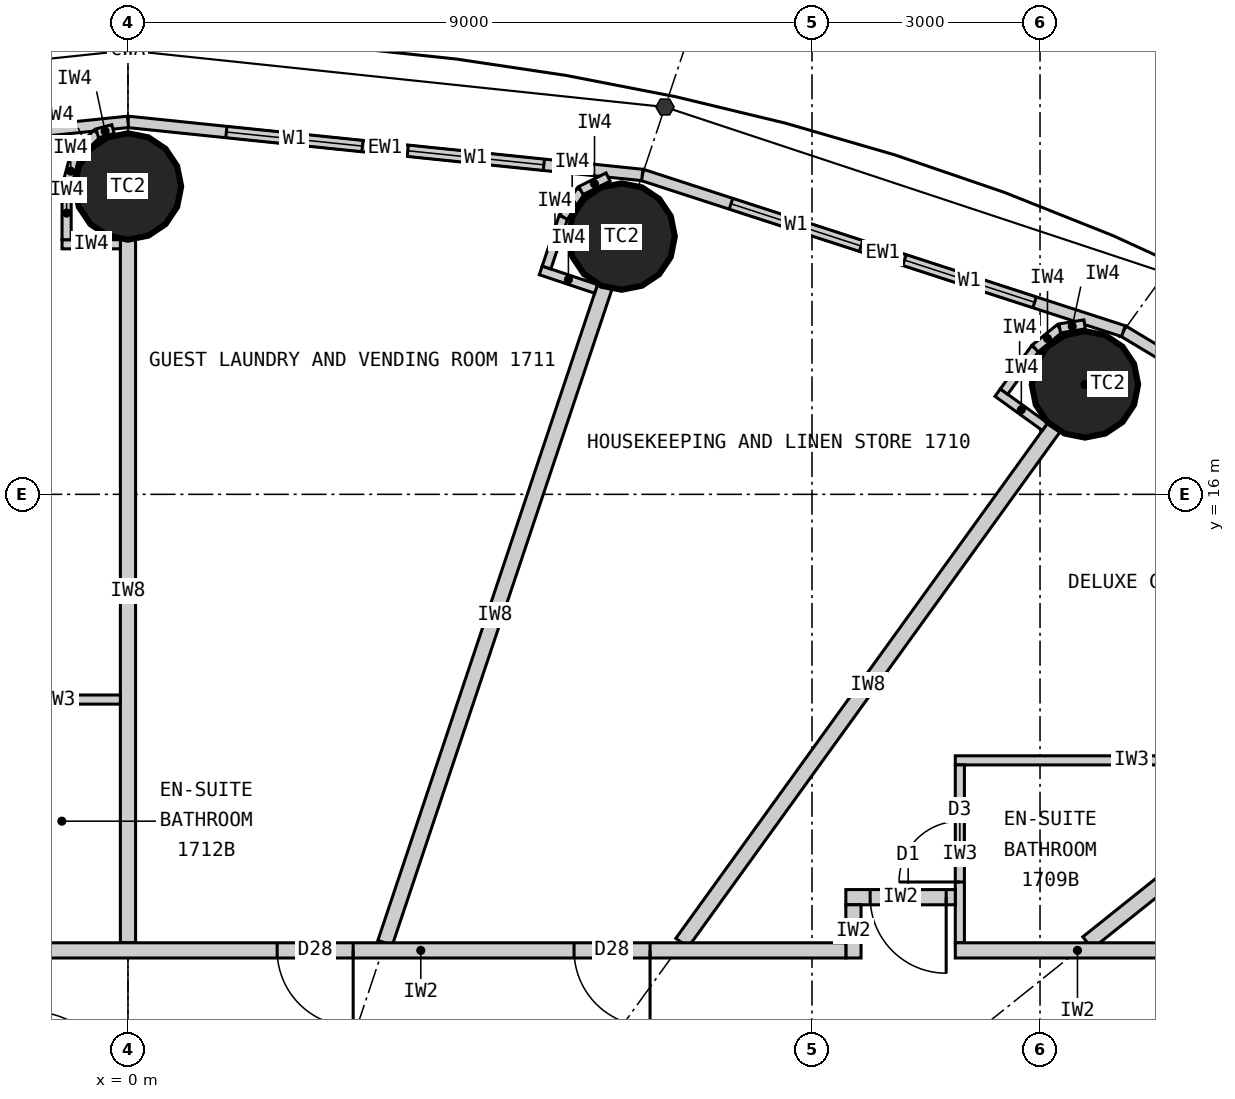
"""IFC4 building model, lengths in metres.
Left out: names, types, materials, properties, quantities, classifications, styles, units other than length and angle.
Written with IfcOpenShell. Run it as: python <this file> out.ifc"""

import sys

from ifc_helpers import new_model, si_unit, direction, frame, frame_2d, origin, origin_2d, place, context, subcontext, project, spatial, rectangle, circle, extrude, element, fill, save


model = new_model("IFC4")
c1 = context("Model", 3, precision=1e-05, world=origin(), true_north=direction((0.0, 1.0)))
c2 = subcontext(c1, "Body", "Model", "MODEL_VIEW")
j1 = project(units=[si_unit("LENGTHUNIT", "METRE"), si_unit("PLANEANGLEUNIT", "RADIAN")], contexts=[c1])
p1 = place(None, origin())
s1 = spatial("IfcSite", under=j1, at=p1, CompositionType="ELEMENT")
p2 = place(p1, origin())
s2 = spatial("IfcBuilding", under=s1, at=p2, CompositionType="ELEMENT")
p3 = place(p2, frame((0.0, 0.0, 70.5)))
s3 = spatial("IfcBuildingStorey", under=s2, at=p3, CompositionType="ELEMENT", Elevation=70.5)
for number, where, z_axis, x_axis in (
    (1, (12.591, 17.447, 0.0), (0.0, 0.0, 1.0), (1.0, 0.0, 0.0)),
    (2, (6.495, 19.391, 0.0), (0.0, 0.0, 1.0), (1.0, 0.0, 0.0)),
    (3, (0.0, 20.05, 0.0), (0.0, 0.0, 1.0), (1.0, 0.0, 0.0)),
):
    element("IfcColumn", number, at=place(p3, frame(where, z_axis=z_axis, x_axis=x_axis)), inside=s3, PredefinedType="COLUMN", context=c2, shape_type="SweptSolid", body=[
        extrude(circle(Radius=0.7, at=origin_2d()), origin(), (0.0, 0.0, 1.0), 3.3),
    ])
p4 = place(p3, frame((18.57, 14.856, 0.0), z_axis=(0.0, 0.0, 1.0), x_axis=(-0.856983180864, 0.515344377787, 0.0)))
e4 = element("IfcWall", 4, at=p4, inside=s3, PredefinedType="ELEMENTEDWALL", context=c2, shape_type="SweptSolid", body=[
    extrude(rectangle(XDim=6.386, YDim=0.15, at=frame_2d((3.193, 0.0))), origin(), (0.0, 0.0, 1.0), 3.12),
])
p5 = place(p4, frame((1.093, 0.0, 0.9)))
e5 = element("IfcOpeningElement", 5, at=p5, cuts=e4, PredefinedType="OPENING", context=c2, shape_type="SweptSolid", body=[
    extrude(rectangle(XDim=1.8, YDim=1.9, at=frame_2d((0.9, 0.95))), frame((0.0, 0.085, 0.0), z_axis=(0.0, -1.0, 0.0), x_axis=(1.0, 0.0, 0.0)), (0.0, 0.0, 1.0), 0.17),
])
p6 = place(p4, frame((3.493, 0.0, 0.9)))
e6 = element("IfcOpeningElement", 6, at=p6, cuts=e4, PredefinedType="OPENING", context=c2, shape_type="SweptSolid", body=[
    extrude(rectangle(XDim=1.8, YDim=1.9, at=frame_2d((0.9, 0.95))), frame((0.0, 0.085, 0.0), z_axis=(0.0, -1.0, 0.0), x_axis=(1.0, 0.0, 0.0)), (0.0, 0.0, 1.0), 0.17),
])
p7 = place(p3, frame((13.096, 18.147, 0.0), z_axis=(0.0, 0.0, 1.0), x_axis=(-0.951137534625, 0.308767534285, 0.0)))
e7 = element("IfcWall", 7, at=p7, inside=s3, PredefinedType="ELEMENTEDWALL", context=c2, shape_type="SweptSolid", body=[
    extrude(rectangle(XDim=6.655, YDim=0.15, at=frame_2d((3.328, 0.0))), origin(), (0.0, 0.0, 1.0), 3.12),
])
p8 = place(p7, frame((1.228, 0.0, 0.9)))
e8 = element("IfcOpeningElement", 8, at=p8, cuts=e7, PredefinedType="OPENING", context=c2, shape_type="SweptSolid", body=[
    extrude(rectangle(XDim=1.8, YDim=1.9, at=frame_2d((0.9, 0.95))), frame((0.0, 0.085, 0.0), z_axis=(0.0, -1.0, 0.0), x_axis=(1.0, 0.0, 0.0)), (0.0, 0.0, 1.0), 0.17),
])
p9 = place(p7, frame((3.628, 0.0, 0.9)))
e9 = element("IfcOpeningElement", 9, at=p9, cuts=e7, PredefinedType="OPENING", context=c2, shape_type="SweptSolid", body=[
    extrude(rectangle(XDim=1.8, YDim=1.9, at=frame_2d((0.9, 0.95))), frame((0.0, 0.085, 0.0), z_axis=(0.0, -1.0, 0.0), x_axis=(1.0, 0.0, 0.0)), (0.0, 0.0, 1.0), 0.17),
])
p10 = place(p3, frame((6.766, 20.202, 0.0), z_axis=(0.0, 0.0, 1.0), x_axis=(-0.994721394369, 0.102612609291, 0.0)))
e10 = element("IfcWall", 10, at=p10, inside=s3, PredefinedType="ELEMENTEDWALL", context=c2, shape_type="SweptSolid", body=[
    extrude(rectangle(XDim=6.802, YDim=0.15, at=frame_2d((3.401, 0.0))), origin(), (0.0, 0.0, 1.0), 3.12),
])
p11 = place(p10, frame((1.301, 0.0, 0.9)))
e11 = element("IfcOpeningElement", 11, at=p11, cuts=e10, PredefinedType="OPENING", context=c2, shape_type="SweptSolid", body=[
    extrude(rectangle(XDim=1.8, YDim=1.9, at=frame_2d((0.9, 0.95))), frame((0.0, 0.085, 0.0), z_axis=(0.0, -1.0, 0.0), x_axis=(1.0, 0.0, 0.0)), (0.0, 0.0, 1.0), 0.17),
])
p12 = place(p10, frame((3.701, 0.0, 0.9)))
e12 = element("IfcOpeningElement", 12, at=p12, cuts=e10, PredefinedType="OPENING", context=c2, shape_type="SweptSolid", body=[
    extrude(rectangle(XDim=1.8, YDim=1.9, at=frame_2d((0.9, 0.95))), frame((0.0, 0.085, 0.0), z_axis=(0.0, -1.0, 0.0), x_axis=(1.0, 0.0, 0.0)), (0.0, 0.0, 1.0), 0.17),
])
p13 = place(p3, frame((0.0, 20.9, 0.0), z_axis=(0.0, 0.0, 1.0), x_axis=(-0.994721394369, -0.102612609291, 0.0)))
e13 = element("IfcWall", 13, at=p13, inside=s3, PredefinedType="ELEMENTEDWALL", context=c2, shape_type="SweptSolid", body=[
    extrude(rectangle(XDim=6.802, YDim=0.15, at=frame_2d((3.401, 0.0))), origin(), (0.0, 0.0, 1.0), 3.12),
])
p14 = place(p13, frame((1.301, 0.0, 0.9)))
e14 = element("IfcOpeningElement", 14, at=p14, cuts=e13, PredefinedType="OPENING", context=c2, shape_type="SweptSolid", body=[
    extrude(rectangle(XDim=1.8, YDim=1.9, at=frame_2d((0.9, 0.95))), frame((0.0, 0.085, 0.0), z_axis=(0.0, -1.0, 0.0), x_axis=(1.0, 0.0, 0.0)), (0.0, 0.0, 1.0), 0.17),
])
p15 = place(p13, frame((3.701, 0.0, 0.9)))
e15 = element("IfcOpeningElement", 15, at=p15, cuts=e13, PredefinedType="OPENING", context=c2, shape_type="SweptSolid", body=[
    extrude(rectangle(XDim=1.8, YDim=1.9, at=frame_2d((0.9, 0.95))), frame((0.0, 0.085, 0.0), z_axis=(0.0, -1.0, 0.0), x_axis=(1.0, 0.0, 0.0)), (0.0, 0.0, 1.0), 0.17),
])
p16 = place(p3, frame((12.625, 10.1, 0.0), z_axis=(0.0, 0.0, 1.0), x_axis=(0.780892451574, 0.624665493744, 0.0)))
e16 = element("IfcWall", 16, at=p16, inside=s3, PredefinedType="PARTITIONING", context=c2, shape_type="SweptSolid", body=[
    extrude(rectangle(XDim=6.045, YDim=0.2, at=frame_2d((3.022, 0.0))), origin(), (0.0, 0.0, 1.0), 2.32),
])
p17 = place(p3, frame((7.289, 10.1, 0.0), z_axis=(0.0, 0.0, 1.0), x_axis=(0.585198353053, 0.810890182197, 0.0)))
e17 = element("IfcWall", 17, at=p17, inside=s3, PredefinedType="PARTITIONING", context=c2, shape_type="SweptSolid", body=[
    extrude(rectangle(XDim=8.36, YDim=0.2, at=frame_2d((4.18, 0.0))), origin(), (0.0, 0.0, 1.0), 2.32),
])
p18 = place(p3, frame((3.383, 10.1, 0.0), z_axis=(0.0, 0.0, 1.0), x_axis=(0.31759592231, 0.948226149256, 0.0)))
e18 = element("IfcWall", 18, at=p18, inside=s3, PredefinedType="PARTITIONING", context=c2, shape_type="SweptSolid", body=[
    extrude(rectangle(XDim=9.098, YDim=0.2, at=frame_2d((4.549, 0.0))), origin(), (0.0, 0.0, 1.0), 2.32),
])
p19 = place(p3, frame((0.0, 10.1, 0.0), z_axis=(0.0, 0.0, 1.0), x_axis=(0.0, 1.0, 0.0)))
e19 = element("IfcWall", 19, at=p19, inside=s3, PredefinedType="PARTITIONING", context=c2, shape_type="SweptSolid", body=[
    extrude(rectangle(XDim=9.25, YDim=0.2, at=frame_2d((4.625, 0.0))), origin(), (0.0, 0.0, 1.0), 2.32),
])
p20 = place(p3, frame((15.525, 12.5, 0.0), z_axis=(0.0, 0.0, 1.0), x_axis=(-1.0, 0.0, 0.0)))
e20 = element("IfcWall", 20, at=p20, inside=s3, PredefinedType="PARTITIONING", context=c2, shape_type="SweptSolid", body=[
    extrude(rectangle(XDim=4.64, YDim=0.12, at=frame_2d((2.32, 0.0))), origin(), (0.0, 0.0, 1.0), 3.12),
])
p21 = place(p3, frame((10.945, 10.1, 0.0), z_axis=(0.0, 0.0, 1.0), x_axis=(0.0, 1.0, 0.0)))
e21 = element("IfcWall", 21, at=p21, inside=s3, PredefinedType="PARTITIONING", context=c2, shape_type="SweptSolid", body=[
    extrude(rectangle(XDim=2.34, YDim=0.12, at=frame_2d((1.17, 0.0))), origin(), (0.0, 0.0, 1.0), 3.12),
])
p22 = place(p21, frame((0.8, 0.0, 0.0)))
e22 = element("IfcOpeningElement", 22, at=p22, cuts=e21, PredefinedType="OPENING", context=c2, shape_type="SweptSolid", body=[
    extrude(rectangle(XDim=0.8, YDim=2.1, at=frame_2d((0.4, 1.05))), frame((0.0, 0.07, 0.0), z_axis=(0.0, -1.0, 0.0), x_axis=(1.0, 0.0, 0.0)), (0.0, 0.0, 1.0), 0.14),
])
p23 = place(p3, frame((-0.1, 13.3, 0.0), z_axis=(0.0, 0.0, 1.0), x_axis=(-1.0, 0.0, 0.0)))
e23 = element("IfcWall", 23, at=p23, inside=s3, PredefinedType="PARTITIONING", context=c2, shape_type="SweptSolid", body=[
    extrude(rectangle(XDim=1.64, YDim=0.12, at=frame_2d((0.82, 0.0))), origin(), (0.0, 0.0, 1.0), 3.12),
])
p24 = place(p3, frame((9.445, 10.7, 0.0), z_axis=(0.0, 0.0, 1.0), x_axis=(1.0, 0.0, 0.0)))
e24 = element("IfcWall", 24, at=p24, inside=s3, PredefinedType="PARTITIONING", context=c2, shape_type="SweptSolid", body=[
    extrude(rectangle(XDim=1.44, YDim=0.2, at=frame_2d((0.72, 0.0))), origin(), (0.0, 0.0, 1.0), 3.12),
])
p25 = place(p24, frame((0.32, 0.0, 0.0)))
e25 = element("IfcOpeningElement", 25, at=p25, cuts=e24, PredefinedType="OPENING", context=c2, shape_type="SweptSolid", body=[
    extrude(rectangle(XDim=1.0, YDim=2.2, at=frame_2d((0.5, 1.1))), frame((0.0, 0.11, 0.0), z_axis=(0.0, -1.0, 0.0), x_axis=(1.0, 0.0, 0.0)), (0.0, 0.0, 1.0), 0.22),
])
p26 = place(p3, frame((9.545, 9.9, 0.0), z_axis=(0.0, 0.0, 1.0), x_axis=(0.0, 1.0, 0.0)))
e26 = element("IfcWall", 26, at=p26, inside=s3, PredefinedType="PARTITIONING", context=c2, shape_type="SweptSolid", body=[
    extrude(rectangle(XDim=0.7, YDim=0.2, at=frame_2d((0.35, 0.0))), origin(), (0.0, 0.0, 1.0), 3.12),
])
p27 = place(p3, frame((-1.74, 10.0, 0.0), z_axis=(0.0, 0.0, 1.0), x_axis=(1.0, 0.0, 0.0)))
e27 = element("IfcWall", 27, at=p27, inside=s3, PredefinedType="PARTITIONING", context=c2, shape_type="SweptSolid", body=[
    extrude(rectangle(XDim=11.185, YDim=0.2, at=frame_2d((5.593, 0.0))), origin(), (0.0, 0.0, 1.0), 3.12),
])
p28 = place(p27, frame((7.609, 0.0, 0.0)))
e28 = element("IfcOpeningElement", 28, at=p28, cuts=e27, PredefinedType="OPENING", context=c2, shape_type="SweptSolid", body=[
    extrude(rectangle(XDim=1.0, YDim=2.2, at=frame_2d((0.5, 1.1))), frame((0.0, 0.11, 0.0), z_axis=(0.0, -1.0, 0.0), x_axis=(1.0, 0.0, 0.0)), (0.0, 0.0, 1.0), 0.22),
])
p29 = place(p27, frame((3.703, 0.0, 0.0)))
e29 = element("IfcOpeningElement", 29, at=p29, cuts=e27, PredefinedType="OPENING", context=c2, shape_type="SweptSolid", body=[
    extrude(rectangle(XDim=1.0, YDim=2.2, at=frame_2d((0.5, 1.1))), frame((0.0, 0.11, 0.0), z_axis=(0.0, -1.0, 0.0), x_axis=(1.0, 0.0, 0.0)), (0.0, 0.0, 1.0), 0.22),
])
p30 = place(p3, frame((10.885, 10.0, 0.0), z_axis=(0.0, 0.0, 1.0), x_axis=(1.0, 0.0, 0.0)))
e30 = element("IfcWall", 30, at=p30, inside=s3, PredefinedType="PARTITIONING", context=c2, shape_type="SweptSolid", body=[
    extrude(rectangle(XDim=3.215, YDim=0.2, at=frame_2d((1.607, 0.0))), origin(), (0.0, 0.0, 1.0), 3.12),
])
p31 = place(p3, frame((12.065, 16.889, 0.0), z_axis=(0.0, 0.0, 1.0), x_axis=(-0.810821798253, 0.585293098778, 0.0)))
e31 = element("IfcWall", 31, at=p31, inside=s3, PredefinedType="PARTITIONING", context=c2, shape_type="SweptSolid", body=[
    extrude(rectangle(XDim=0.768, YDim=0.12, at=frame_2d((0.384, 0.0))), origin(), (0.0, 0.0, 1.0), 3.12),
])
p32 = place(p3, frame((11.526, 17.351, 0.0), z_axis=(0.0, 0.0, 1.0), x_axis=(0.585223113993, 0.810872312296, 0.0)))
e32 = element("IfcWall", 32, at=p32, inside=s3, PredefinedType="PARTITIONING", context=c2, shape_type="SweptSolid", body=[
    extrude(rectangle(XDim=0.7, YDim=0.12, at=frame_2d((0.35, 0.0))), origin(), (0.0, 0.0, 1.0), 3.12),
])
p33 = place(p3, frame((11.936, 17.919, 0.0), z_axis=(0.0, 0.0, 1.0), x_axis=(0.775023088441, 0.631932917629, 0.0)))
e33 = element("IfcWall", 33, at=p33, inside=s3, PredefinedType="PARTITIONING", context=c2, shape_type="SweptSolid", body=[
    extrude(rectangle(XDim=0.418, YDim=0.12, at=frame_2d((0.209, 0.0))), origin(), (0.0, 0.0, 1.0), 3.12),
])
p34 = place(p3, frame((12.26, 18.183, 0.0), z_axis=(0.0, 0.0, 1.0), x_axis=(0.987218661664, 0.159371622511, 0.0)))
e34 = element("IfcWall", 34, at=p34, inside=s3, PredefinedType="PARTITIONING", context=c2, shape_type="SweptSolid", body=[
    extrude(rectangle(XDim=0.331, YDim=0.12, at=frame_2d((0.166, 0.0))), origin(), (0.0, 0.0, 1.0), 3.12),
])
p35 = place(p3, frame((6.159, 18.702, 0.0), z_axis=(0.0, 0.0, 1.0), x_axis=(-0.948173154049, 0.31775410295, 0.0)))
e35 = element("IfcWall", 35, at=p35, inside=s3, PredefinedType="PARTITIONING", context=c2, shape_type="SweptSolid", body=[
    extrude(rectangle(XDim=0.768, YDim=0.12, at=frame_2d((0.384, 0.0))), origin(), (0.0, 0.0, 1.0), 3.12),
])
p36 = place(p3, frame((5.507, 18.984, 0.0), z_axis=(0.0, 0.0, 1.0), x_axis=(0.317692050622, 0.948193946918, 0.0)))
e36 = element("IfcWall", 36, at=p36, inside=s3, PredefinedType="PARTITIONING", context=c2, shape_type="SweptSolid", body=[
    extrude(rectangle(XDim=0.7, YDim=0.12, at=frame_2d((0.35, 0.0))), origin(), (0.0, 0.0, 1.0), 3.12),
])
p37 = place(p3, frame((5.729, 19.648, 0.0), z_axis=(0.0, 0.0, 1.0), x_axis=(0.552135764955, 0.833754218615, 0.0)))
e37 = element("IfcWall", 37, at=p37, inside=s3, PredefinedType="PARTITIONING", context=c2, shape_type="SweptSolid", body=[
    extrude(rectangle(XDim=0.418, YDim=0.12, at=frame_2d((0.209, 0.0))), origin(), (0.0, 0.0, 1.0), 3.12),
])
p38 = place(p3, frame((5.96, 19.996, 0.0), z_axis=(0.0, 0.0, 1.0), x_axis=(0.895160725913, 0.445743507842, 0.0)))
e38 = element("IfcWall", 38, at=p38, inside=s3, PredefinedType="PARTITIONING", context=c2, shape_type="SweptSolid", body=[
    extrude(rectangle(XDim=0.399, YDim=0.12, at=frame_2d((0.199, 0.0))), origin(), (0.0, 0.0, 1.0), 3.12),
])
p39 = place(p3, frame((-0.1, 19.29, 0.0), z_axis=(0.0, 0.0, 1.0), x_axis=(-1.0, 0.0, 0.0)))
e39 = element("IfcWall", 39, at=p39, inside=s3, PredefinedType="PARTITIONING", context=c2, shape_type="SweptSolid", body=[
    extrude(rectangle(XDim=0.767, YDim=0.12, at=frame_2d((0.384, 0.0))), origin(), (0.0, 0.0, 1.0), 3.12),
])
p40 = place(p3, frame((-0.808, 19.35, 0.0), z_axis=(0.0, 0.0, 1.0), x_axis=(0.0, 1.0, 0.0)))
e40 = element("IfcWall", 40, at=p40, inside=s3, PredefinedType="PARTITIONING", context=c2, shape_type="SweptSolid", body=[
    extrude(rectangle(XDim=0.7, YDim=0.12, at=frame_2d((0.35, 0.0))), origin(), (0.0, 0.0, 1.0), 3.12),
])
p41 = place(p3, frame((-0.808, 20.05, 0.0), z_axis=(0.0, 0.0, 1.0), x_axis=(0.2592614205, 0.965807183573, 0.0)))
e41 = element("IfcWall", 41, at=p41, inside=s3, PredefinedType="PARTITIONING", context=c2, shape_type="SweptSolid", body=[
    extrude(rectangle(XDim=0.418, YDim=0.12, at=frame_2d((0.209, 0.0))), origin(), (0.0, 0.0, 1.0), 3.12),
])
p42 = place(p3, frame((-0.699, 20.454, 0.0), z_axis=(0.0, 0.0, 1.0), x_axis=(0.707106781187, 0.707106781187, 0.0)))
e42 = element("IfcWall", 42, at=p42, inside=s3, PredefinedType="PARTITIONING", context=c2, shape_type="SweptSolid", body=[
    extrude(rectangle(XDim=0.418, YDim=0.12, at=frame_2d((0.209, 0.0))), origin(), (0.0, 0.0, 1.0), 3.12),
])
p43 = place(p3, frame((-0.404, 20.749, 0.0), z_axis=(0.0, 0.0, 1.0), x_axis=(0.965759066438, 0.25944060128, 0.0)))
e43 = element("IfcWall", 43, at=p43, inside=s3, PredefinedType="PARTITIONING", context=c2, shape_type="SweptSolid", body=[
    extrude(rectangle(XDim=0.214, YDim=0.12, at=frame_2d((0.107, 0.0))), origin(), (0.0, 0.0, 1.0), 3.12),
])
p44 = place(p8, origin())
e44 = element("IfcWindow", 44, at=p44, inside=s3, PartitioningType="SINGLE_PANEL", PredefinedType="WINDOW", context=c2, shape_type="SweptSolid", body=[
    extrude(rectangle(XDim=1.8, YDim=1.9, at=frame_2d((0.9, 0.95))), frame((0.0, 0.03, 0.0), z_axis=(0.0, -1.0, 0.0), x_axis=(1.0, 0.0, 0.0)), (0.0, 0.0, 1.0), 0.06),
])
fill(e8, e44)
p45 = place(p9, origin())
e45 = element("IfcWindow", 45, at=p45, inside=s3, PartitioningType="SINGLE_PANEL", PredefinedType="WINDOW", context=c2, shape_type="SweptSolid", body=[
    extrude(rectangle(XDim=1.8, YDim=1.9, at=frame_2d((0.9, 0.95))), frame((0.0, 0.03, 0.0), z_axis=(0.0, -1.0, 0.0), x_axis=(1.0, 0.0, 0.0)), (0.0, 0.0, 1.0), 0.06),
])
fill(e9, e45)
p46 = place(p11, origin())
e46 = element("IfcWindow", 46, at=p46, inside=s3, PartitioningType="SINGLE_PANEL", PredefinedType="WINDOW", context=c2, shape_type="SweptSolid", body=[
    extrude(rectangle(XDim=1.8, YDim=1.9, at=frame_2d((0.9, 0.95))), frame((0.0, 0.03, 0.0), z_axis=(0.0, -1.0, 0.0), x_axis=(1.0, 0.0, 0.0)), (0.0, 0.0, 1.0), 0.06),
])
fill(e11, e46)
p47 = place(p12, origin())
e47 = element("IfcWindow", 47, at=p47, inside=s3, PartitioningType="SINGLE_PANEL", PredefinedType="WINDOW", context=c2, shape_type="SweptSolid", body=[
    extrude(rectangle(XDim=1.8, YDim=1.9, at=frame_2d((0.9, 0.95))), frame((0.0, 0.03, 0.0), z_axis=(0.0, -1.0, 0.0), x_axis=(1.0, 0.0, 0.0)), (0.0, 0.0, 1.0), 0.06),
])
fill(e12, e47)
p48 = place(p22, origin())
e48 = element("IfcDoor", 48, at=p48, inside=s3, OperationType="SINGLE_SWING_LEFT", PredefinedType="DOOR", context=c2, shape_type="SweptSolid", body=[
    extrude(rectangle(XDim=0.8, YDim=2.1, at=frame_2d((0.4, 1.05))), frame((0.0, 0.025, 0.0), z_axis=(0.0, -1.0, 0.0), x_axis=(1.0, 0.0, 0.0)), (0.0, 0.0, 1.0), 0.05),
])
fill(e22, e48)
p49 = place(p25, origin())
e49 = element("IfcDoor", 49, at=p49, inside=s3, OperationType="SINGLE_SWING_RIGHT", PredefinedType="DOOR", context=c2, shape_type="SweptSolid", body=[
    extrude(rectangle(XDim=1.0, YDim=2.2, at=frame_2d((0.5, 1.1))), frame((0.0, 0.025, 0.0), z_axis=(0.0, -1.0, 0.0), x_axis=(1.0, 0.0, 0.0)), (0.0, 0.0, 1.0), 0.05),
])
fill(e25, e49)
p50 = place(p28, origin())
e50 = element("IfcDoor", 50, at=p50, inside=s3, OperationType="SINGLE_SWING_RIGHT", PredefinedType="DOOR", context=c2, shape_type="SweptSolid", body=[
    extrude(rectangle(XDim=1.0, YDim=2.2, at=frame_2d((0.5, 1.1))), frame((0.0, 0.025, 0.0), z_axis=(0.0, -1.0, 0.0), x_axis=(1.0, 0.0, 0.0)), (0.0, 0.0, 1.0), 0.05),
])
fill(e28, e50)
p51 = place(p29, origin())
e51 = element("IfcDoor", 51, at=p51, inside=s3, OperationType="SINGLE_SWING_RIGHT", PredefinedType="DOOR", context=c2, shape_type="SweptSolid", body=[
    extrude(rectangle(XDim=1.0, YDim=2.2, at=frame_2d((0.5, 1.1))), frame((0.0, 0.025, 0.0), z_axis=(0.0, -1.0, 0.0), x_axis=(1.0, 0.0, 0.0)), (0.0, 0.0, 1.0), 0.05),
])
fill(e29, e51)
save(model, sys.argv[1])
